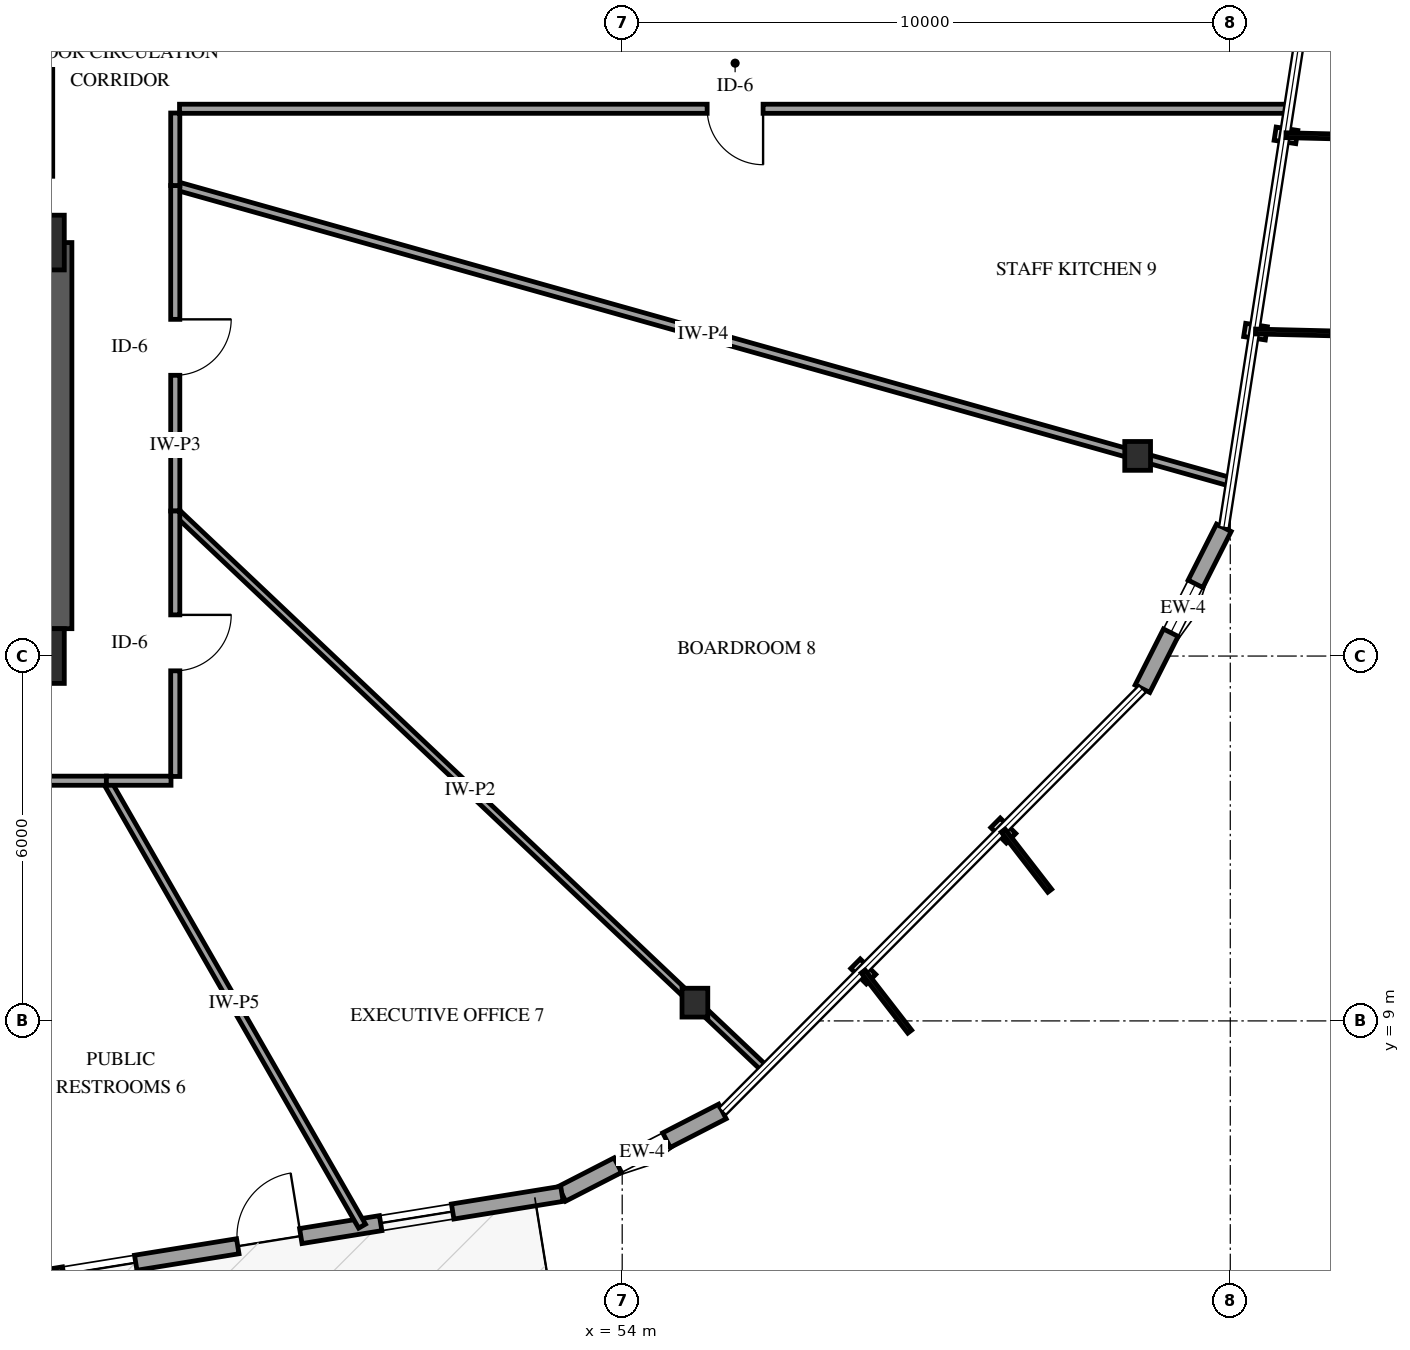
"""IFC4 building model, lengths in metres.
Left out: names, types, materials, properties, quantities, classifications, styles, units other than length and angle.
Written with IfcOpenShell. Run it as: python <this file> out.ifc"""

import sys

from ifc_helpers import new_model, si_unit, direction, frame, frame_2d, origin, origin_2d, place, context, subcontext, project, spatial, rectangle, i_section, extrude, element, fill, save


model = new_model("IFC4")
c1 = context("Model", 3, precision=1e-05, world=origin(), true_north=direction((0.0, 1.0)))
c2 = subcontext(c1, "Body", "Model", "MODEL_VIEW")
j1 = project(units=[si_unit("LENGTHUNIT", "METRE"), si_unit("PLANEANGLEUNIT", "RADIAN")], contexts=[c1])
p1 = place(None, origin())
s1 = spatial("IfcSite", under=j1, at=p1, CompositionType="ELEMENT")
p2 = place(p1, origin())
s2 = spatial("IfcBuilding", under=s1, at=p2, CompositionType="ELEMENT")
p3 = place(p2, frame((0.0, 0.0, 62.6)))
s3 = spatial("IfcBuildingStorey", under=s2, at=p3, CompositionType="ELEMENT", Elevation=62.6)
p4 = place(p3, frame((44.6, 15.45, 0.0), z_axis=(0.0, 0.0, 1.0), x_axis=(0.0, 1.0, 0.0)))
e1 = element("IfcWall", 1, at=p4, inside=s3, PredefinedType="SHEAR", context=c2, shape_type="SweptSolid", body=[
    extrude(rectangle(XDim=6.35, YDim=0.7, at=frame_2d((3.175, 0.0))), origin(), (0.0, 0.0, 1.0), 4.0),
])
for number, where, z_axis, x_axis in (
    (2, (44.6, 15.0, 0.0), (0.0, 0.0, 1.0), (1.0, 0.0, 0.0)),
    (3, (44.6, 21.8, 0.0), (0.0, 0.0, 1.0), (1.0, 0.0, 0.0)),
):
    element("IfcColumn", number, at=place(p3, frame(where, z_axis=z_axis, x_axis=x_axis)), inside=s3, PredefinedType="PILASTER", context=c2, shape_type="SweptSolid", body=[
        extrude(rectangle(XDim=0.45, YDim=0.9, at=origin_2d()), origin(), (0.0, 0.0, 1.0), 4.0),
    ])
for number, where, z_axis, x_axis in (
    (4, (55.196, 9.3, 0.0), (0.0, 0.0, 1.0), (1.0, 0.0, 0.0)),
    (5, (62.477, 18.292, 0.0), (0.0, 0.0, 1.0), (1.0, 0.0, 0.0)),
):
    element("IfcColumn", number, at=place(p3, frame(where, z_axis=z_axis, x_axis=x_axis)), inside=s3, PredefinedType="COLUMN", context=c2, shape_type="SweptSolid", body=[
        extrude(i_section(OverallWidth=0.424, OverallDepth=0.474, WebThickness=0.048, FlangeThickness=0.077, FilletRadius=0.038, at=origin_2d()), origin(), (0.0, 0.0, 1.0), 4.0),
    ])
p5 = place(p3, frame((53.009, 6.156, 0.0), z_axis=(0.0, 0.0, 1.0), x_axis=(0.889603167839, 0.456734281361, 0.0)))
e6 = element("IfcWall", 6, at=p5, inside=s3, PredefinedType="SOLIDWALL", context=c2, shape_type="SweptSolid", body=[
    extrude(rectangle(XDim=2.967, YDim=0.27, at=frame_2d((1.483, 0.0))), origin(), (0.0, 0.0, 1.0), 3.079),
])
p6 = place(p5, frame((1.033, 0.0, 0.75)))
e7 = element("IfcOpeningElement", 7, at=p6, cuts=e6, PredefinedType="OPENING", context=c2, shape_type="SweptSolid", body=[
    extrude(rectangle(XDim=0.9, YDim=1.5, at=frame_2d((0.45, 0.75))), frame((0.0, 0.145, 0.0), z_axis=(0.0, -1.0, 0.0), x_axis=(1.0, 0.0, 0.0)), (0.0, 0.0, 1.0), 0.29),
])
p7 = place(p3, frame((43.334, 4.592, 0.0), z_axis=(0.0, 0.0, 1.0), x_axis=(0.987191297579, 0.159541035424, 0.0)))
e8 = element("IfcWall", 8, at=p7, inside=s3, PredefinedType="SOLIDWALL", context=c2, shape_type="SweptSolid", body=[
    extrude(rectangle(XDim=9.8, YDim=0.25, at=frame_2d((4.9, 0.0))), origin(), (0.0, 0.0, 1.0), 3.079),
])
p8 = place(p7, frame((4.4, 0.0, 0.0)))
e9 = element("IfcOpeningElement", 9, at=p8, cuts=e8, PredefinedType="OPENING", context=c2, shape_type="SweptSolid", body=[
    extrude(rectangle(XDim=1.05, YDim=2.15, at=frame_2d((0.525, 1.075))), frame((0.0, 0.135, 0.0), z_axis=(0.0, -1.0, 0.0), x_axis=(1.0, 0.0, 0.0)), (0.0, 0.0, 1.0), 0.27),
])
p9 = place(p7, frame((1.5, 0.0, 0.72)))
e10 = element("IfcOpeningElement", 10, at=p9, cuts=e8, PredefinedType="OPENING", context=c2, shape_type="SweptSolid", body=[
    extrude(rectangle(XDim=1.2, YDim=1.6, at=frame_2d((0.6, 0.8))), frame((0.0, 0.135, 0.0), z_axis=(0.0, -1.0, 0.0), x_axis=(1.0, 0.0, 0.0)), (0.0, 0.0, 1.0), 0.27),
])
p10 = place(p7, frame((6.78, 0.0, 0.72)))
e11 = element("IfcOpeningElement", 11, at=p10, cuts=e8, PredefinedType="OPENING", context=c2, shape_type="SweptSolid", body=[
    extrude(rectangle(XDim=1.2, YDim=1.6, at=frame_2d((0.6, 0.8))), frame((0.0, 0.135, 0.0), z_axis=(0.0, -1.0, 0.0), x_axis=(1.0, 0.0, 0.0)), (0.0, 0.0, 1.0), 0.27),
])
p11 = place(p3, frame((62.556, 14.462, 0.0), z_axis=(0.0, 0.0, 1.0), x_axis=(0.451225097824, 0.892410169762, 0.0)))
e12 = element("IfcWall", 12, at=p11, inside=s3, PredefinedType="SOLIDWALL", context=c2, shape_type="SweptSolid", body=[
    extrude(rectangle(XDim=2.967, YDim=0.27, at=frame_2d((1.483, 0.0))), origin(), (0.0, 0.0, 1.0), 3.079),
])
p12 = place(p11, frame((1.033, 0.0, 0.75)))
e13 = element("IfcOpeningElement", 13, at=p12, cuts=e12, PredefinedType="OPENING", context=c2, shape_type="SweptSolid", body=[
    extrude(rectangle(XDim=0.9, YDim=1.5, at=frame_2d((0.45, 0.75))), frame((0.0, 0.145, 0.0), z_axis=(0.0, -1.0, 0.0), x_axis=(1.0, 0.0, 0.0)), (0.0, 0.0, 1.0), 0.29),
])
p13 = place(p3, frame((64.963, 24.0, 0.0), z_axis=(0.0, 0.0, 1.0), x_axis=(-1.0, 0.0, 0.0)))
e14 = element("IfcWall", 14, at=p13, inside=s3, PredefinedType="PARTITIONING", context=c2, shape_type="SweptSolid", body=[
    extrude(rectangle(XDim=18.243, YDim=0.15, at=frame_2d((9.122, 0.0))), origin(), (0.0, 0.0, 1.0), 3.7),
])
p14 = place(p13, frame((8.646, 0.0, 0.0)))
e15 = element("IfcOpeningElement", 15, at=p14, cuts=e14, PredefinedType="OPENING", context=c2, shape_type="SweptSolid", body=[
    extrude(rectangle(XDim=0.92, YDim=2.12, at=frame_2d((0.46, 1.06))), frame((0.0, 0.085, 0.0), z_axis=(0.0, -1.0, 0.0), x_axis=(1.0, 0.0, 0.0)), (0.0, 0.0, 1.0), 0.17),
])
p15 = place(p3, frame((46.65, 22.738, 0.0), z_axis=(0.0, 0.0, 1.0), x_axis=(0.96273546892, -0.270444849983, 0.0)))
e16 = element("IfcWall", 16, at=p15, inside=s3, PredefinedType="PARTITIONING", context=c2, shape_type="SweptSolid", body=[
    extrude(rectangle(XDim=18.033, YDim=0.14, at=frame_2d((9.017, 0.0))), origin(), (0.0, 0.0, 1.0), 2.995),
])
p16 = place(p3, frame((46.65, 17.385, 0.0), z_axis=(0.0, 0.0, 1.0), x_axis=(0.726390421285, -0.68728229707, 0.0)))
e17 = element("IfcWall", 17, at=p16, inside=s3, PredefinedType="PARTITIONING", context=c2, shape_type="SweptSolid", body=[
    extrude(rectangle(XDim=13.347, YDim=0.12, at=frame_2d((6.673, 0.0))), origin(), (0.0, 0.0, 1.0), 2.995),
])
p17 = place(p3, frame((45.517, 12.95, 0.0), z_axis=(0.0, 0.0, 1.0), x_axis=(0.497846985281, -0.867264884131, 0.0)))
e18 = element("IfcWall", 18, at=p17, inside=s3, PredefinedType="PARTITIONING", context=c2, shape_type="SweptSolid", body=[
    extrude(rectangle(XDim=8.446, YDim=0.13, at=frame_2d((4.223, 0.0))), origin(), (0.0, 0.0, 1.0), 3.074),
])
p18 = place(p3, frame((46.65, 22.738, 0.0), z_axis=(0.0, 0.0, 1.0), x_axis=(0.0, -1.0, 0.0)))
e19 = element("IfcWall", 19, at=p18, inside=s3, PredefinedType="PARTITIONING", context=c2, shape_type="SweptSolid", body=[
    extrude(rectangle(XDim=5.353, YDim=0.15, at=frame_2d((2.677, 0.0))), origin(), (0.0, 0.0, 1.0), 3.7),
])
p19 = place(p18, frame((2.201, 0.0, 0.0)))
e20 = element("IfcOpeningElement", 20, at=p19, cuts=e19, PredefinedType="OPENING", context=c2, shape_type="SweptSolid", body=[
    extrude(rectangle(XDim=0.92, YDim=2.12, at=frame_2d((0.46, 1.06))), frame((0.0, 0.085, 0.0), z_axis=(0.0, -1.0, 0.0), x_axis=(1.0, 0.0, 0.0)), (0.0, 0.0, 1.0), 0.17),
])
p20 = place(p3, frame((46.65, 17.385, 0.0), z_axis=(0.0, 0.0, 1.0), x_axis=(0.0, -1.0, 0.0)))
e21 = element("IfcWall", 21, at=p20, inside=s3, PredefinedType="PARTITIONING", context=c2, shape_type="SweptSolid", body=[
    extrude(rectangle(XDim=4.365, YDim=0.15, at=frame_2d((2.183, 0.0))), origin(), (0.0, 0.0, 1.0), 3.7),
])
p21 = place(p20, frame((1.708, 0.0, 0.0)))
e22 = element("IfcOpeningElement", 22, at=p21, cuts=e21, PredefinedType="OPENING", context=c2, shape_type="SweptSolid", body=[
    extrude(rectangle(XDim=0.92, YDim=2.12, at=frame_2d((0.46, 1.06))), frame((0.0, 0.085, 0.0), z_axis=(0.0, -1.0, 0.0), x_axis=(1.0, 0.0, 0.0)), (0.0, 0.0, 1.0), 0.17),
])
p22 = place(p3, frame((45.517, 12.95, 0.0), z_axis=(0.0, 0.0, 1.0), x_axis=(-1.0, 0.0, 0.0)))
e23 = element("IfcWall", 23, at=p22, inside=s3, PredefinedType="PARTITIONING", context=c2, shape_type="SweptSolid", body=[
    extrude(rectangle(XDim=3.423, YDim=0.15, at=frame_2d((1.711, 0.0))), origin(), (0.0, 0.0, 1.0), 3.7),
])
p23 = place(p22, frame((1.237, 0.0, 0.0)))
e24 = element("IfcOpeningElement", 24, at=p23, cuts=e23, PredefinedType="OPENING", context=c2, shape_type="SweptSolid", body=[
    extrude(rectangle(XDim=0.92, YDim=2.12, at=frame_2d((0.46, 1.06))), frame((0.0, 0.085, 0.0), z_axis=(0.0, -1.0, 0.0), x_axis=(1.0, 0.0, 0.0)), (0.0, 0.0, 1.0), 0.17),
])
p24 = place(p3, frame((46.65, 23.93, 0.0), z_axis=(0.0, 0.0, 1.0), x_axis=(0.0, -1.0, 0.0)))
e25 = element("IfcWall", 25, at=p24, inside=s3, PredefinedType="PARTITIONING", context=c2, shape_type="SweptSolid", body=[
    extrude(rectangle(XDim=1.192, YDim=0.15, at=frame_2d((0.596, 0.0))), origin(), (0.0, 0.0, 1.0), 3.7),
])
p25 = place(p3, frame((46.58, 12.95, 0.0), z_axis=(0.0, 0.0, 1.0), x_axis=(-1.0, 0.0, 0.0)))
e26 = element("IfcWall", 26, at=p25, inside=s3, PredefinedType="PARTITIONING", context=c2, shape_type="SweptSolid", body=[
    extrude(rectangle(XDim=1.063, YDim=0.15, at=frame_2d((0.531, 0.0))), origin(), (0.0, 0.0, 1.0), 3.7),
])
p26 = place(p6, origin())
e27 = element("IfcWindow", 27, at=p26, inside=s3, PartitioningType="SINGLE_PANEL", PredefinedType="WINDOW", context=c2, shape_type="SweptSolid", body=[
    extrude(rectangle(XDim=0.9, YDim=1.5, at=frame_2d((0.45, 0.75))), frame((0.0, 0.03, 0.0), z_axis=(0.0, -1.0, 0.0), x_axis=(1.0, 0.0, 0.0)), (0.0, 0.0, 1.0), 0.06),
])
fill(e7, e27)
p27 = place(p8, origin())
e28 = element("IfcDoor", 28, at=p27, inside=s3, OperationType="SINGLE_SWING_RIGHT", PredefinedType="DOOR", context=c2, shape_type="SweptSolid", body=[
    extrude(rectangle(XDim=1.05, YDim=2.15, at=frame_2d((0.525, 1.075))), frame((0.0, 0.025, 0.0), z_axis=(0.0, -1.0, 0.0), x_axis=(1.0, 0.0, 0.0)), (0.0, 0.0, 1.0), 0.05),
])
fill(e9, e28)
p28 = place(p9, origin())
e29 = element("IfcWindow", 29, at=p28, inside=s3, PartitioningType="SINGLE_PANEL", PredefinedType="WINDOW", context=c2, shape_type="SweptSolid", body=[
    extrude(rectangle(XDim=1.2, YDim=1.6, at=frame_2d((0.6, 0.8))), frame((0.0, 0.03, 0.0), z_axis=(0.0, -1.0, 0.0), x_axis=(1.0, 0.0, 0.0)), (0.0, 0.0, 1.0), 0.06),
])
fill(e10, e29)
p29 = place(p10, origin())
e30 = element("IfcWindow", 30, at=p29, inside=s3, PartitioningType="SINGLE_PANEL", PredefinedType="WINDOW", context=c2, shape_type="SweptSolid", body=[
    extrude(rectangle(XDim=1.2, YDim=1.6, at=frame_2d((0.6, 0.8))), frame((0.0, 0.03, 0.0), z_axis=(0.0, -1.0, 0.0), x_axis=(1.0, 0.0, 0.0)), (0.0, 0.0, 1.0), 0.06),
])
fill(e11, e30)
p30 = place(p12, origin())
e31 = element("IfcWindow", 31, at=p30, inside=s3, PartitioningType="SINGLE_PANEL", PredefinedType="WINDOW", context=c2, shape_type="SweptSolid", body=[
    extrude(rectangle(XDim=0.9, YDim=1.5, at=frame_2d((0.45, 0.75))), frame((0.0, 0.03, 0.0), z_axis=(0.0, -1.0, 0.0), x_axis=(1.0, 0.0, 0.0)), (0.0, 0.0, 1.0), 0.06),
])
fill(e13, e31)
p31 = place(p14, origin())
e32 = element("IfcDoor", 32, at=p31, inside=s3, OperationType="SINGLE_SWING_LEFT", PredefinedType="DOOR", context=c2, shape_type="SweptSolid", body=[
    extrude(rectangle(XDim=0.92, YDim=2.12, at=frame_2d((0.46, 1.06))), frame((0.0, 0.025, 0.0), z_axis=(0.0, -1.0, 0.0), x_axis=(1.0, 0.0, 0.0)), (0.0, 0.0, 1.0), 0.05),
])
fill(e15, e32)
p32 = place(p19, origin())
e33 = element("IfcDoor", 33, at=p32, inside=s3, OperationType="SINGLE_SWING_LEFT", PredefinedType="DOOR", context=c2, shape_type="SweptSolid", body=[
    extrude(rectangle(XDim=0.92, YDim=2.12, at=frame_2d((0.46, 1.06))), frame((0.0, 0.025, 0.0), z_axis=(0.0, -1.0, 0.0), x_axis=(1.0, 0.0, 0.0)), (0.0, 0.0, 1.0), 0.05),
])
fill(e20, e33)
p33 = place(p21, origin())
e34 = element("IfcDoor", 34, at=p33, inside=s3, OperationType="SINGLE_SWING_LEFT", PredefinedType="DOOR", context=c2, shape_type="SweptSolid", body=[
    extrude(rectangle(XDim=0.92, YDim=2.12, at=frame_2d((0.46, 1.06))), frame((0.0, 0.025, 0.0), z_axis=(0.0, -1.0, 0.0), x_axis=(1.0, 0.0, 0.0)), (0.0, 0.0, 1.0), 0.05),
])
fill(e22, e34)
save(model, sys.argv[1])
